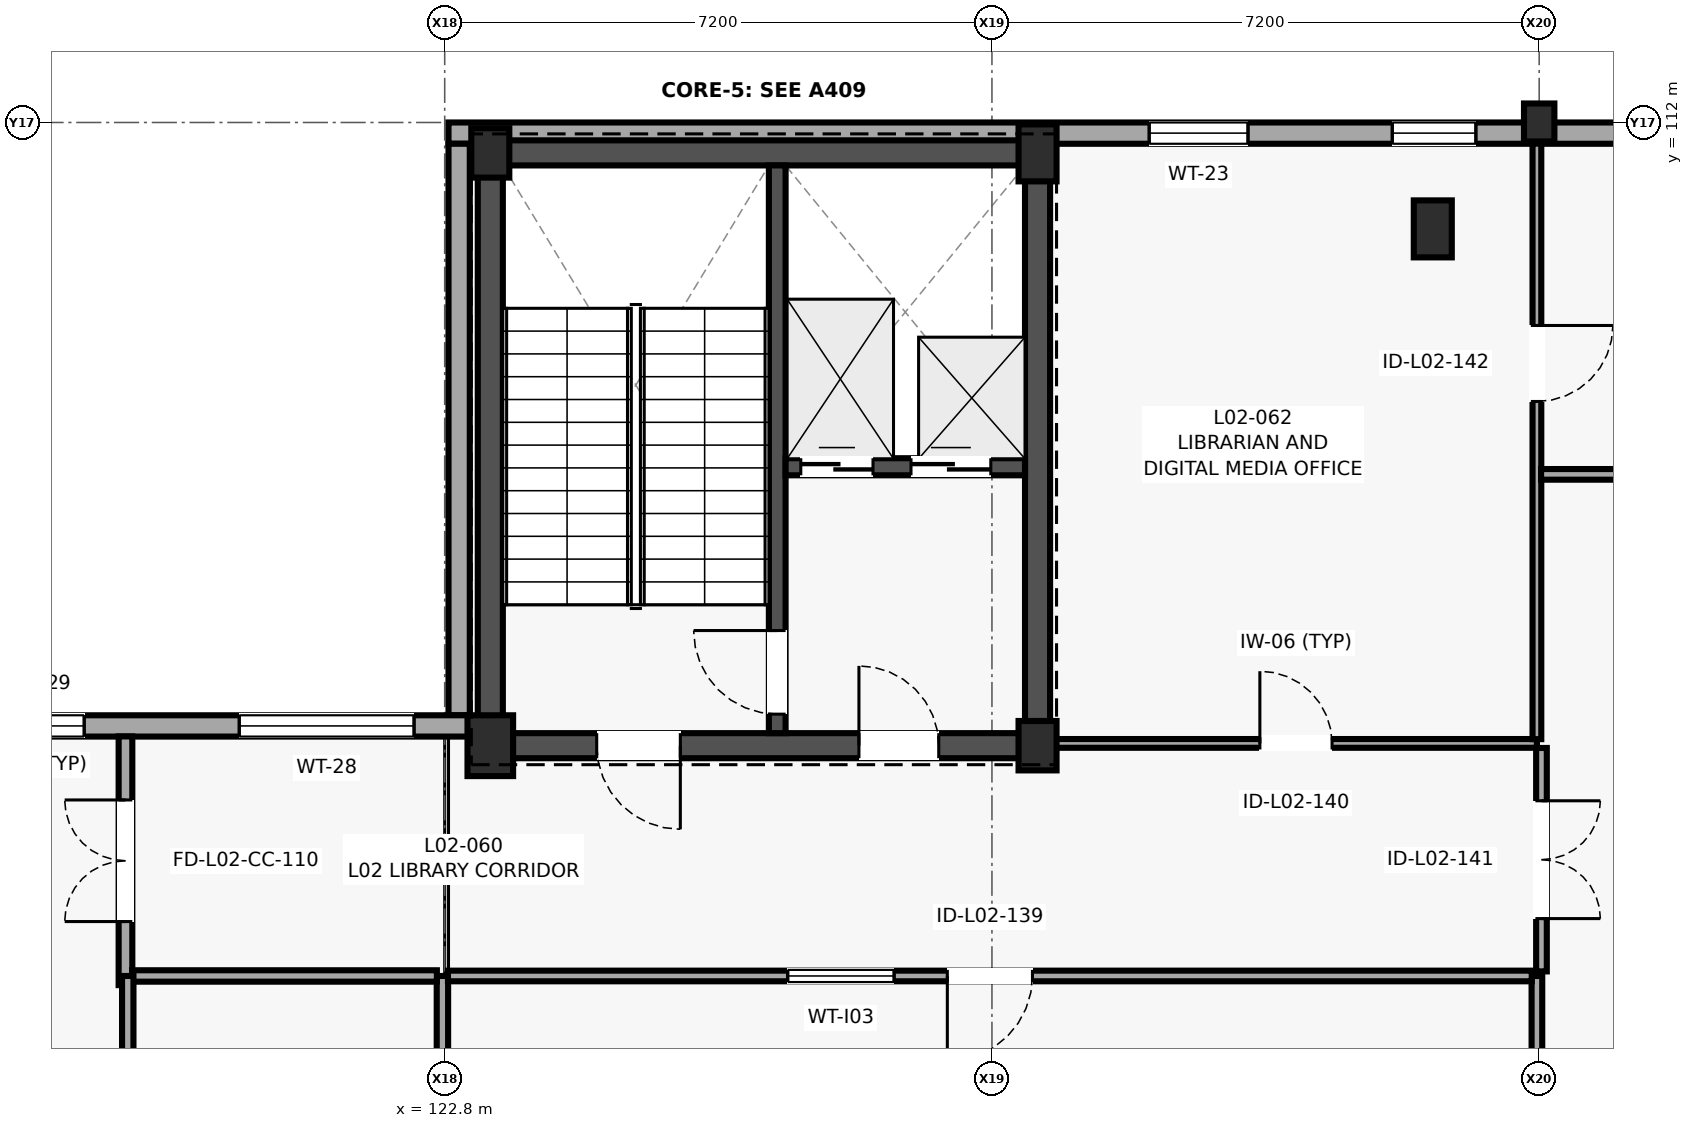
"""IFC4 building model, lengths in metres.
Left out: names, types, materials, properties, quantities, classifications, styles, units other than length and angle.
Written with IfcOpenShell. Run it as: python <this file> out.ifc"""

import sys

from ifc_helpers import new_model, si_unit, direction, frame, frame_2d, origin, origin_2d, place, context, subcontext, project, spatial, rectangle, extrude, element, fill, save


model = new_model("IFC4")
c1 = context("Model", 3, precision=1e-05, world=origin(), true_north=direction((0.0, 1.0)))
c2 = subcontext(c1, "Body", "Model", "MODEL_VIEW")
j1 = project(units=[si_unit("LENGTHUNIT", "METRE"), si_unit("PLANEANGLEUNIT", "RADIAN")], contexts=[c1])
p1 = place(None, origin())
s1 = spatial("IfcSite", under=j1, at=p1, CompositionType="ELEMENT")
p2 = place(p1, origin())
s2 = spatial("IfcBuilding", under=s1, at=p2, CompositionType="ELEMENT")
p3 = place(p2, frame((0.0, 0.0, 8.2)))
s3 = spatial("IfcBuildingStorey", under=s2, at=p3, CompositionType="ELEMENT", Elevation=8.2)
p4 = place(p3, frame((123.4, 103.8, 0.0), z_axis=(0.0, 0.0, 1.0), x_axis=(1.0, 0.0, 0.0)))
e1 = element("IfcColumn", 1, at=p4, inside=s3, PredefinedType="COLUMN", context=c2, shape_type="SweptSolid", body=[
    extrude(rectangle(XDim=0.6, YDim=0.8, at=origin_2d()), origin(), (0.0, 0.0, 1.0), 4.0),
])
for number, where, z_axis, x_axis in (
    (2, (123.4, 111.6, 0.0), (0.0, 0.0, 1.0), (1.0, 0.0, 0.0)),
    (3, (130.6, 103.8, 0.0), (0.0, 0.0, 1.0), (1.0, 0.0, 0.0)),
):
    element("IfcColumn", number, at=place(p3, frame(where, z_axis=z_axis, x_axis=x_axis)), inside=s3, PredefinedType="COLUMN", context=c2, shape_type="SweptSolid", body=[
        extrude(rectangle(XDim=0.5, YDim=0.65, at=origin_2d()), origin(), (0.0, 0.0, 1.0), 4.0),
    ])
for number, where, z_axis, x_axis in (
    (4, (130.6, 111.6, 0.0), (0.0, 0.0, 1.0), (1.0, 0.0, 0.0)),
    (5, (135.8, 110.6, 0.0), (0.0, 0.0, 1.0), (1.0, 0.0, 0.0)),
):
    element("IfcColumn", number, at=place(p3, frame(where, z_axis=z_axis, x_axis=x_axis)), inside=s3, PredefinedType="COLUMN", context=c2, shape_type="SweptSolid", body=[
        extrude(rectangle(XDim=0.5, YDim=0.75, at=origin_2d()), origin(), (0.0, 0.0, 1.0), 4.0),
    ])
p5 = place(p3, frame((137.2, 112.0, 0.0), z_axis=(0.0, 0.0, 1.0), x_axis=(1.0, 0.0, 0.0)))
e6 = element("IfcColumn", 6, at=p5, inside=s3, PredefinedType="PILASTER", context=c2, shape_type="SweptSolid", body=[
    extrude(rectangle(XDim=0.4, YDim=0.5, at=origin_2d()), origin(), (0.0, 0.0, 1.0), 4.0),
])
p6 = place(p3, frame((138.641, 111.86, 0.0), z_axis=(0.0, 0.0, 1.0), x_axis=(-1.0, 0.0, 0.0)))
e7 = element("IfcWall", 7, at=p6, inside=s3, PredefinedType="SOLIDWALL", context=c2, shape_type="SweptSolid", body=[
    extrude(rectangle(XDim=15.791, YDim=0.28, at=frame_2d((7.896, 0.0))), origin(), (0.0, 0.0, 1.0), 2.865),
])
p7 = place(p6, frame((2.274, 0.0, 0.65)))
e8 = element("IfcOpeningElement", 8, at=p7, cuts=e7, PredefinedType="OPENING", context=c2, shape_type="SweptSolid", body=[
    extrude(rectangle(XDim=1.1, YDim=2.1, at=frame_2d((0.55, 1.05))), frame((0.0, 0.15, 0.0), z_axis=(0.0, -1.0, 0.0), x_axis=(1.0, 0.0, 0.0)), (0.0, 0.0, 1.0), 0.3),
])
p8 = place(p6, frame((5.272, 0.0, 1.05)))
e9 = element("IfcOpeningElement", 9, at=p8, cuts=e7, PredefinedType="OPENING", context=c2, shape_type="SweptSolid", body=[
    extrude(rectangle(XDim=1.3, YDim=1.6, at=frame_2d((0.65, 0.8))), frame((0.0, 0.15, 0.0), z_axis=(0.0, -1.0, 0.0), x_axis=(1.0, 0.0, 0.0)), (0.0, 0.0, 1.0), 0.3),
])
p9 = place(p3, frame((122.99, 111.72, 0.0), z_axis=(0.0, 0.0, 1.0), x_axis=(0.0, -1.0, 0.0)))
e10 = element("IfcWall", 10, at=p9, inside=s3, PredefinedType="SOLIDWALL", context=c2, shape_type="SweptSolid", body=[
    extrude(rectangle(XDim=7.52, YDim=0.28, at=frame_2d((3.76, 0.0))), origin(), (0.0, 0.0, 1.0), 3.78),
])
p10 = place(p3, frame((123.13, 104.06, 0.0), z_axis=(0.0, 0.0, 1.0), x_axis=(-1.0, 0.0, 0.0)))
e11 = element("IfcWall", 11, at=p10, inside=s3, PredefinedType="SOLIDWALL", context=c2, shape_type="SweptSolid", body=[
    extrude(rectangle(XDim=7.53, YDim=0.28, at=frame_2d((3.765, 0.0))), origin(), (0.0, 0.0, 1.0), 3.78),
])
p11 = place(p10, frame((0.733, 0.0, 1.05)))
e12 = element("IfcOpeningElement", 12, at=p11, cuts=e11, PredefinedType="OPENING", context=c2, shape_type="SweptSolid", body=[
    extrude(rectangle(XDim=2.3, YDim=1.45, at=frame_2d((1.15, 0.725))), frame((0.0, 0.15, 0.0), z_axis=(0.0, -1.0, 0.0), x_axis=(1.0, 0.0, 0.0)), (0.0, 0.0, 1.0), 0.3),
])
p12 = place(p10, frame((5.073, 0.0, 1.05)))
e13 = element("IfcOpeningElement", 13, at=p12, cuts=e11, PredefinedType="OPENING", context=c2, shape_type="SweptSolid", body=[
    extrude(rectangle(XDim=1.15, YDim=1.4, at=frame_2d((0.575, 0.7))), frame((0.0, 0.15, 0.0), z_axis=(0.0, -1.0, 0.0), x_axis=(1.0, 0.0, 0.0)), (0.0, 0.0, 1.0), 0.3),
])
p13 = place(p3, frame((123.235, 103.8, 0.0), z_axis=(0.0, 0.0, 1.0), x_axis=(1.0, 0.0, 0.0)))
e14 = element("IfcWall", 14, at=p13, inside=s3, PredefinedType="SHEAR", context=c2, shape_type="SweptSolid", body=[
    extrude(rectangle(XDim=7.53, YDim=0.33, at=frame_2d((3.765, 0.0))), origin(), (0.0, 0.0, 1.0), 3.78),
])
p14 = place(p13, frame((5.015, 0.0, 0.0)))
e15 = element("IfcOpeningElement", 15, at=p14, cuts=e14, PredefinedType="OPENING", context=c2, shape_type="SweptSolid", body=[
    extrude(rectangle(XDim=1.05, YDim=2.15, at=frame_2d((0.525, 1.075))), frame((0.0, 0.175, 0.0), z_axis=(0.0, -1.0, 0.0), x_axis=(1.0, 0.0, 0.0)), (0.0, 0.0, 1.0), 0.35),
])
p15 = place(p13, frame((1.565, 0.0, 0.0)))
e16 = element("IfcOpeningElement", 16, at=p15, cuts=e14, PredefinedType="OPENING", context=c2, shape_type="SweptSolid", body=[
    extrude(rectangle(XDim=1.1, YDim=2.15, at=frame_2d((0.55, 1.075))), frame((0.0, 0.175, 0.0), z_axis=(0.0, -1.0, 0.0), x_axis=(1.0, 0.0, 0.0)), (0.0, 0.0, 1.0), 0.35),
])
p16 = place(p3, frame((123.235, 111.6, 0.0), z_axis=(0.0, 0.0, 1.0), x_axis=(1.0, 0.0, 0.0)))
e17 = element("IfcWall", 17, at=p16, inside=s3, PredefinedType="SHEAR", context=c2, shape_type="SweptSolid", body=[
    extrude(rectangle(XDim=7.53, YDim=0.33, at=frame_2d((3.765, 0.0))), origin(), (0.0, 0.0, 1.0), 3.78),
])
for number, where, z_axis, x_axis in (
    (18, (123.4, 103.965, 0.0), (0.0, 0.0, 1.0), (0.0, 1.0, 0.0)),
    (19, (130.6, 103.965, 0.0), (0.0, 0.0, 1.0), (0.0, 1.0, 0.0)),
):
    element("IfcWall", number, at=place(p3, frame(where, z_axis=z_axis, x_axis=x_axis)), inside=s3, PredefinedType="SHEAR", context=c2, shape_type="SweptSolid", body=[
        extrude(rectangle(XDim=7.47, YDim=0.33, at=frame_2d((3.735, 0.0))), origin(), (0.0, 0.0, 1.0), 3.78),
    ])
p17 = place(p3, frame((127.175, 103.965, 0.0), z_axis=(0.0, 0.0, 1.0), x_axis=(0.0, 1.0, 0.0)))
e20 = element("IfcWall", 20, at=p17, inside=s3, PredefinedType="SHEAR", context=c2, shape_type="SweptSolid", body=[
    extrude(rectangle(XDim=7.47, YDim=0.22, at=frame_2d((3.735, 0.0))), origin(), (0.0, 0.0, 1.0), 3.78),
])
p18 = place(p17, frame((0.25, 0.0, 0.0)))
e21 = element("IfcOpeningElement", 21, at=p18, cuts=e20, PredefinedType="OPENING", context=c2, shape_type="SweptSolid", body=[
    extrude(rectangle(XDim=1.1, YDim=2.15, at=frame_2d((0.55, 1.075))), frame((0.0, 0.12, 0.0), z_axis=(0.0, -1.0, 0.0), x_axis=(1.0, 0.0, 0.0)), (0.0, 0.0, 1.0), 0.24),
])
p19 = place(p3, frame((127.285, 107.47, 0.0), z_axis=(0.0, 0.0, 1.0), x_axis=(1.0, 0.0, 0.0)))
e22 = element("IfcWall", 22, at=p19, inside=s3, PredefinedType="SHEAR", context=c2, shape_type="SweptSolid", body=[
    extrude(rectangle(XDim=3.15, YDim=0.225, at=frame_2d((1.575, 0.0))), origin(), (0.0, 0.0, 1.0), 3.78),
])
p20 = place(p19, frame((0.2, 0.0, 0.0)))
e23 = element("IfcOpeningElement", 23, at=p20, cuts=e22, PredefinedType="OPENING", context=c2, shape_type="SweptSolid", body=[
    extrude(rectangle(XDim=0.95, YDim=2.15, at=frame_2d((0.475, 1.075))), frame((0.0, 0.123, 0.0), z_axis=(0.0, -1.0, 0.0), x_axis=(1.0, 0.0, 0.0)), (0.0, 0.0, 1.0), 0.245),
])
p21 = place(p19, frame((1.65, 0.0, 0.0)))
e24 = element("IfcOpeningElement", 24, at=p21, cuts=e22, PredefinedType="OPENING", context=c2, shape_type="SweptSolid", body=[
    extrude(rectangle(XDim=1.05, YDim=2.2, at=frame_2d((0.525, 1.1))), frame((0.0, 0.123, 0.0), z_axis=(0.0, -1.0, 0.0), x_axis=(1.0, 0.0, 0.0)), (0.0, 0.0, 1.0), 0.245),
])
p22 = place(p3, frame((118.6, 100.65, 0.0), z_axis=(0.0, 0.0, 1.0), x_axis=(0.0, 1.0, 0.0)))
e25 = element("IfcWall", 25, at=p22, inside=s3, PredefinedType="PARTITIONING", context=c2, shape_type="SweptSolid", body=[
    extrude(rectangle(XDim=3.272, YDim=0.18, at=frame_2d((1.636, 0.0))), origin(), (0.0, 0.0, 1.0), 3.78),
])
p23 = place(p22, frame((0.836, 0.0, 0.0)))
e26 = element("IfcOpeningElement", 26, at=p23, cuts=e25, PredefinedType="OPENING", context=c2, shape_type="SweptSolid", body=[
    extrude(rectangle(XDim=1.6, YDim=2.25, at=frame_2d((0.8, 1.125))), frame((0.0, 0.1, 0.0), z_axis=(0.0, -1.0, 0.0), x_axis=(1.0, 0.0, 0.0)), (0.0, 0.0, 1.0), 0.2),
])
p24 = place(p3, frame((122.77, 96.678, 0.0), z_axis=(0.0, 0.0, 1.0), x_axis=(0.0, 1.0, 0.0)))
e27 = element("IfcWall", 27, at=p24, inside=s3, PredefinedType="PARTITIONING", context=c2, shape_type="SweptSolid", body=[
    extrude(rectangle(XDim=4.092, YDim=0.15, at=frame_2d((2.046, 0.0))), origin(), (0.0, 0.0, 1.0), 3.715),
])
p25 = place(p3, frame((122.697, 100.77, 0.0), z_axis=(0.0, 0.0, 1.0), x_axis=(-1.0, 0.0, 0.0)))
e28 = element("IfcWall", 28, at=p25, inside=s3, PredefinedType="PARTITIONING", context=c2, shape_type="SweptSolid", body=[
    extrude(rectangle(XDim=4.009, YDim=0.15, at=frame_2d((2.004, 0.0))), origin(), (0.0, 0.0, 1.0), 3.715),
])
p26 = place(p3, frame((118.63, 100.77, 0.0), z_axis=(0.0, 0.0, 1.0), x_axis=(0.0, -1.0, 0.0)))
e29 = element("IfcWall", 29, at=p26, inside=s3, PredefinedType="PARTITIONING", context=c2, shape_type="SweptSolid", body=[
    extrude(rectangle(XDim=10.922, YDim=0.15, at=frame_2d((5.461, 0.0))), origin(), (0.0, 0.0, 1.0), 3.165),
])
p27 = place(p26, frame((4.886, 0.0, 0.0)))
e30 = element("IfcOpeningElement", 30, at=p27, cuts=e29, PredefinedType="OPENING", context=c2, shape_type="SweptSolid", body=[
    extrude(rectangle(XDim=1.15, YDim=2.2, at=frame_2d((0.575, 1.1))), frame((0.0, 0.085, 0.0), z_axis=(0.0, -1.0, 0.0), x_axis=(1.0, 0.0, 0.0)), (0.0, 0.0, 1.0), 0.17),
])
p28 = place(p3, frame((137.17, 96.678, 0.0), z_axis=(0.0, 0.0, 1.0), x_axis=(0.0, 1.0, 0.0)))
e31 = element("IfcWall", 31, at=p28, inside=s3, PredefinedType="PARTITIONING", context=c2, shape_type="SweptSolid", body=[
    extrude(rectangle(XDim=4.092, YDim=0.14, at=frame_2d((2.046, 0.0))), origin(), (0.0, 0.0, 1.0), 3.115),
])
p29 = place(p3, frame((137.102, 100.77, 0.0), z_axis=(0.0, 0.0, 1.0), x_axis=(-1.0, 0.0, 0.0)))
e32 = element("IfcWall", 32, at=p29, inside=s3, PredefinedType="PARTITIONING", context=c2, shape_type="SweptSolid", body=[
    extrude(rectangle(XDim=14.259, YDim=0.14, at=frame_2d((7.129, 0.0))), origin(), (0.0, 0.0, 1.0), 3.715),
])
p30 = place(p29, frame((6.569, 0.0, 0.0)))
e33 = element("IfcOpeningElement", 33, at=p30, cuts=e32, PredefinedType="OPENING", context=c2, shape_type="SweptSolid", body=[
    extrude(rectangle(XDim=1.12, YDim=2.18, at=frame_2d((0.56, 1.09))), frame((0.0, 0.08, 0.0), z_axis=(0.0, -1.0, 0.0), x_axis=(1.0, 0.0, 0.0)), (0.0, 0.0, 1.0), 0.16),
])
p31 = place(p29, frame((8.389, 0.0, 1.05)))
e34 = element("IfcOpeningElement", 34, at=p31, cuts=e32, PredefinedType="OPENING", context=c2, shape_type="SweptSolid", body=[
    extrude(rectangle(XDim=1.4, YDim=1.05, at=frame_2d((0.7, 0.525))), frame((0.0, 0.08, 0.0), z_axis=(0.0, -1.0, 0.0), x_axis=(1.0, 0.0, 0.0)), (0.0, 0.0, 1.0), 0.16),
])
p32 = place(p3, frame((130.83, 103.83, 0.0), z_axis=(0.0, 0.0, 1.0), x_axis=(1.0, 0.0, 0.0)))
e35 = element("IfcWall", 35, at=p32, inside=s3, PredefinedType="PARTITIONING", context=c2, shape_type="SweptSolid", body=[
    extrude(rectangle(XDim=6.34, YDim=0.115, at=frame_2d((3.17, 0.0))), origin(), (0.0, 0.0, 1.0), 3.715),
])
p33 = place(p32, frame((2.695, 0.0, 0.0)))
e36 = element("IfcOpeningElement", 36, at=p33, cuts=e35, PredefinedType="OPENING", context=c2, shape_type="SweptSolid", body=[
    extrude(rectangle(XDim=0.95, YDim=2.05, at=frame_2d((0.475, 1.025))), frame((0.0, 0.067, 0.0), z_axis=(0.0, -1.0, 0.0), x_axis=(1.0, 0.0, 0.0)), (0.0, 0.0, 1.0), 0.135),
])
p34 = place(p3, frame((137.17, 103.886, 0.0), z_axis=(0.0, 0.0, 1.0), x_axis=(0.0, 1.0, 0.0)))
e37 = element("IfcWall", 37, at=p34, inside=s3, PredefinedType="PARTITIONING", context=c2, shape_type="SweptSolid", body=[
    extrude(rectangle(XDim=7.836, YDim=0.115, at=frame_2d((3.918, 0.0))), origin(), (0.0, 0.0, 1.0), 3.115),
])
p35 = place(p34, frame((4.443, 0.0, 0.0)))
e38 = element("IfcOpeningElement", 38, at=p35, cuts=e37, PredefinedType="OPENING", context=c2, shape_type="SweptSolid", body=[
    extrude(rectangle(XDim=1.0, YDim=2.1, at=frame_2d((0.5, 1.05))), frame((0.0, 0.067, 0.0), z_axis=(0.0, -1.0, 0.0), x_axis=(1.0, 0.0, 0.0)), (0.0, 0.0, 1.0), 0.135),
])
p36 = place(p3, frame((155.102, 107.37, 0.0), z_axis=(0.0, 0.0, 1.0), x_axis=(-1.0, 0.0, 0.0)))
e39 = element("IfcWall", 39, at=p36, inside=s3, PredefinedType="PARTITIONING", context=c2, shape_type="SweptSolid", body=[
    extrude(rectangle(XDim=17.877, YDim=0.14, at=frame_2d((8.938, 0.0))), origin(), (0.0, 0.0, 1.0), 3.78),
])
p37 = place(p3, frame((137.23, 103.77, 0.0), z_axis=(0.0, 0.0, 1.0), x_axis=(0.0, -1.0, 0.0)))
e40 = element("IfcWall", 40, at=p37, inside=s3, PredefinedType="PARTITIONING", context=c2, shape_type="SweptSolid", body=[
    extrude(rectangle(XDim=2.94, YDim=0.14, at=frame_2d((1.47, 0.0))), origin(), (0.0, 0.0, 1.0), 3.115),
])
p38 = place(p37, frame((0.695, 0.0, 0.0)))
e41 = element("IfcOpeningElement", 41, at=p38, cuts=e40, PredefinedType="OPENING", context=c2, shape_type="SweptSolid", body=[
    extrude(rectangle(XDim=1.55, YDim=2.3, at=frame_2d((0.775, 1.15))), frame((0.0, 0.08, 0.0), z_axis=(0.0, -1.0, 0.0), x_axis=(1.0, 0.0, 0.0)), (0.0, 0.0, 1.0), 0.16),
])
p39 = place(p7, origin())
e42 = element("IfcWindow", 42, at=p39, inside=s3, PartitioningType="SINGLE_PANEL", PredefinedType="WINDOW", context=c2, shape_type="SweptSolid", body=[
    extrude(rectangle(XDim=1.1, YDim=2.1, at=frame_2d((0.55, 1.05))), frame((0.0, 0.03, 0.0), z_axis=(0.0, -1.0, 0.0), x_axis=(1.0, 0.0, 0.0)), (0.0, 0.0, 1.0), 0.06),
])
fill(e8, e42)
p40 = place(p8, origin())
e43 = element("IfcWindow", 43, at=p40, inside=s3, PartitioningType="SINGLE_PANEL", PredefinedType="WINDOW", context=c2, shape_type="SweptSolid", body=[
    extrude(rectangle(XDim=1.3, YDim=1.6, at=frame_2d((0.65, 0.8))), frame((0.0, 0.03, 0.0), z_axis=(0.0, -1.0, 0.0), x_axis=(1.0, 0.0, 0.0)), (0.0, 0.0, 1.0), 0.06),
])
fill(e9, e43)
p41 = place(p11, origin())
e44 = element("IfcWindow", 44, at=p41, inside=s3, PartitioningType="SINGLE_PANEL", PredefinedType="WINDOW", context=c2, shape_type="SweptSolid", body=[
    extrude(rectangle(XDim=2.3, YDim=1.45, at=frame_2d((1.15, 0.725))), frame((0.0, 0.03, 0.0), z_axis=(0.0, -1.0, 0.0), x_axis=(1.0, 0.0, 0.0)), (0.0, 0.0, 1.0), 0.06),
])
fill(e12, e44)
p42 = place(p12, origin())
e45 = element("IfcWindow", 45, at=p42, inside=s3, PartitioningType="SINGLE_PANEL", PredefinedType="WINDOW", context=c2, shape_type="SweptSolid", body=[
    extrude(rectangle(XDim=1.15, YDim=1.4, at=frame_2d((0.575, 0.7))), frame((0.0, 0.03, 0.0), z_axis=(0.0, -1.0, 0.0), x_axis=(1.0, 0.0, 0.0)), (0.0, 0.0, 1.0), 0.06),
])
fill(e13, e45)
p43 = place(p20, origin())
e46 = element("IfcDoor", 46, at=p43, inside=s3, OperationType="SLIDING_TO_LEFT", PredefinedType="DOOR", context=c2, shape_type="SweptSolid", body=[
    extrude(rectangle(XDim=0.95, YDim=2.15, at=frame_2d((0.475, 1.075))), frame((0.0, 0.025, 0.0), z_axis=(0.0, -1.0, 0.0), x_axis=(1.0, 0.0, 0.0)), (0.0, 0.0, 1.0), 0.05),
])
fill(e23, e46)
p44 = place(p21, origin())
e47 = element("IfcDoor", 47, at=p44, inside=s3, OperationType="SLIDING_TO_RIGHT", PredefinedType="DOOR", context=c2, shape_type="SweptSolid", body=[
    extrude(rectangle(XDim=1.05, YDim=2.2, at=frame_2d((0.525, 1.1))), frame((0.0, 0.025, 0.0), z_axis=(0.0, -1.0, 0.0), x_axis=(1.0, 0.0, 0.0)), (0.0, 0.0, 1.0), 0.05),
])
fill(e24, e47)
p45 = place(p18, origin())
e48 = element("IfcDoor", 48, at=p45, inside=s3, OperationType="SINGLE_SWING_RIGHT", PredefinedType="DOOR", context=c2, shape_type="SweptSolid", body=[
    extrude(rectangle(XDim=1.1, YDim=2.15, at=frame_2d((0.55, 1.075))), frame((0.0, 0.025, 0.0), z_axis=(0.0, -1.0, 0.0), x_axis=(1.0, 0.0, 0.0)), (0.0, 0.0, 1.0), 0.05),
])
fill(e21, e48)
p46 = place(p14, origin())
e49 = element("IfcDoor", 49, at=p46, inside=s3, OperationType="SINGLE_SWING_LEFT", PredefinedType="DOOR", context=c2, shape_type="SweptSolid", body=[
    extrude(rectangle(XDim=1.05, YDim=2.15, at=frame_2d((0.525, 1.075))), frame((0.0, 0.025, 0.0), z_axis=(0.0, -1.0, 0.0), x_axis=(1.0, 0.0, 0.0)), (0.0, 0.0, 1.0), 0.05),
])
fill(e15, e49)
p47 = place(p15, frame((1.1, 0.0, 0.0), z_axis=(0.0, 0.0, 1.0), x_axis=(-1.0, 0.0, 0.0)))
e50 = element("IfcDoor", 50, at=p47, inside=s3, OperationType="SINGLE_SWING_RIGHT", PredefinedType="DOOR", context=c2, shape_type="SweptSolid", body=[
    extrude(rectangle(XDim=1.1, YDim=2.15, at=frame_2d((0.55, 1.075))), frame((0.0, 0.025, 0.0), z_axis=(0.0, -1.0, 0.0), x_axis=(1.0, 0.0, 0.0)), (0.0, 0.0, 1.0), 0.05),
])
fill(e16, e50)
p48 = place(p23, origin())
e51 = element("IfcDoor", 51, at=p48, inside=s3, OperationType="DOUBLE_DOOR_SINGLE_SWING", PredefinedType="DOOR", context=c2, shape_type="SweptSolid", body=[
    extrude(rectangle(XDim=1.6, YDim=2.25, at=frame_2d((0.8, 1.125))), frame((0.0, 0.025, 0.0), z_axis=(0.0, -1.0, 0.0), x_axis=(1.0, 0.0, 0.0)), (0.0, 0.0, 1.0), 0.05),
])
fill(e26, e51)
p49 = place(p30, origin())
e52 = element("IfcDoor", 52, at=p49, inside=s3, OperationType="SINGLE_SWING_RIGHT", PredefinedType="DOOR", context=c2, shape_type="SweptSolid", body=[
    extrude(rectangle(XDim=1.12, YDim=2.18, at=frame_2d((0.56, 1.09))), frame((0.0, 0.025, 0.0), z_axis=(0.0, -1.0, 0.0), x_axis=(1.0, 0.0, 0.0)), (0.0, 0.0, 1.0), 0.05),
])
fill(e33, e52)
p50 = place(p31, origin())
e53 = element("IfcWindow", 53, at=p50, inside=s3, PartitioningType="SINGLE_PANEL", PredefinedType="WINDOW", context=c2, shape_type="SweptSolid", body=[
    extrude(rectangle(XDim=1.4, YDim=1.05, at=frame_2d((0.7, 0.525))), frame((0.0, 0.03, 0.0), z_axis=(0.0, -1.0, 0.0), x_axis=(1.0, 0.0, 0.0)), (0.0, 0.0, 1.0), 0.06),
])
fill(e34, e53)
p51 = place(p33, origin())
e54 = element("IfcDoor", 54, at=p51, inside=s3, OperationType="SINGLE_SWING_LEFT", PredefinedType="DOOR", context=c2, shape_type="SweptSolid", body=[
    extrude(rectangle(XDim=0.95, YDim=2.05, at=frame_2d((0.475, 1.025))), frame((0.0, 0.025, 0.0), z_axis=(0.0, -1.0, 0.0), x_axis=(1.0, 0.0, 0.0)), (0.0, 0.0, 1.0), 0.05),
])
fill(e36, e54)
p52 = place(p38, origin())
e55 = element("IfcDoor", 55, at=p52, inside=s3, OperationType="DOUBLE_DOOR_SINGLE_SWING", PredefinedType="DOOR", context=c2, shape_type="SweptSolid", body=[
    extrude(rectangle(XDim=1.55, YDim=2.3, at=frame_2d((0.775, 1.15))), frame((0.0, 0.025, 0.0), z_axis=(0.0, -1.0, 0.0), x_axis=(1.0, 0.0, 0.0)), (0.0, 0.0, 1.0), 0.05),
])
fill(e41, e55)
p53 = place(p35, frame((1.0, 0.0, 0.0), z_axis=(0.0, 0.0, 1.0), x_axis=(-1.0, 0.0, 0.0)))
e56 = element("IfcDoor", 56, at=p53, inside=s3, OperationType="SINGLE_SWING_RIGHT", PredefinedType="DOOR", context=c2, shape_type="SweptSolid", body=[
    extrude(rectangle(XDim=1.0, YDim=2.1, at=frame_2d((0.5, 1.05))), frame((0.0, 0.025, 0.0), z_axis=(0.0, -1.0, 0.0), x_axis=(1.0, 0.0, 0.0)), (0.0, 0.0, 1.0), 0.05),
])
fill(e38, e56)
save(model, sys.argv[1])
